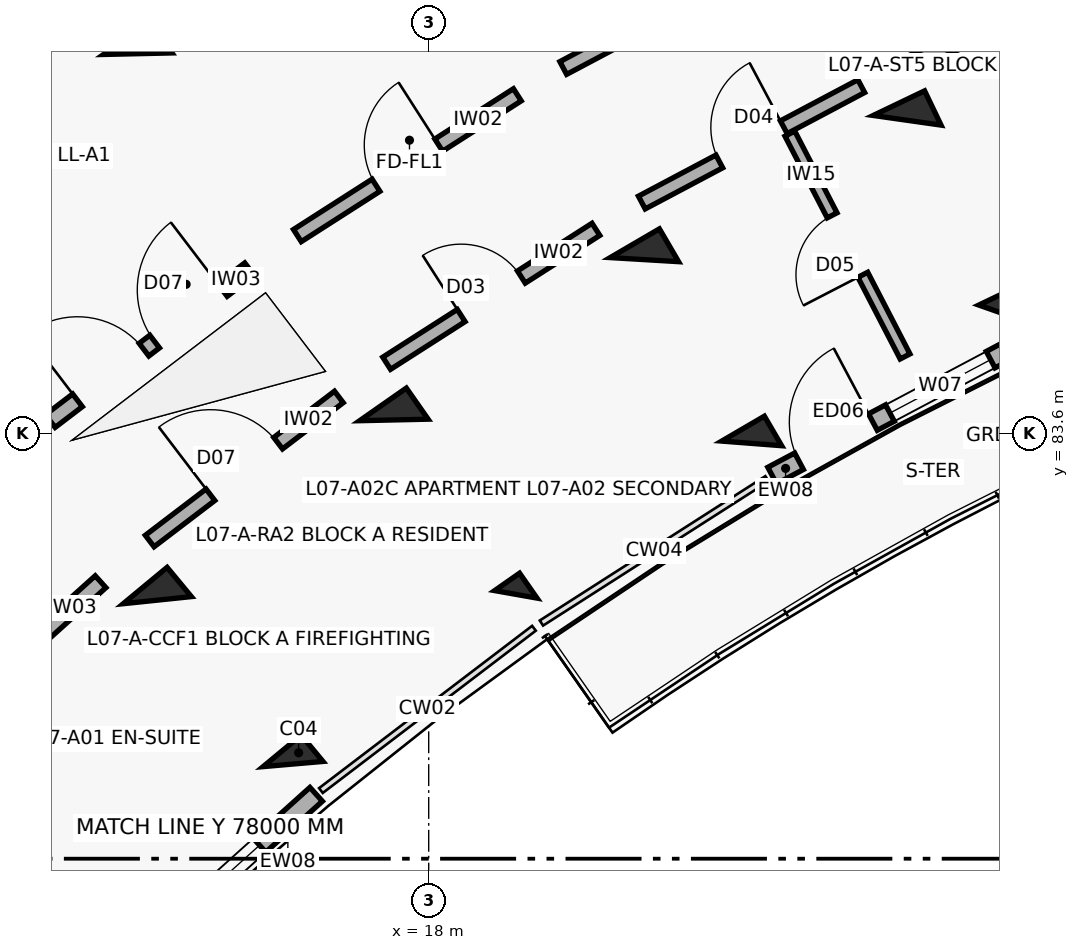
"""IFC4 building model, lengths in metres.
Left out: names, types, materials, properties, quantities, classifications, styles, units other than length and angle.
Written with IfcOpenShell. Run it as: python <this file> out.ifc"""

import sys

from ifc_helpers import new_model, si_unit, direction, frame, frame_2d, origin, origin_2d, place, context, subcontext, project, spatial, rectangle, extrude, element, fill, save


model = new_model("IFC4")
c1 = context("Model", 3, precision=1e-05, world=origin(), true_north=direction((0.0, 1.0)))
c2 = subcontext(c1, "Body", "Model", "MODEL_VIEW")
j1 = project(units=[si_unit("LENGTHUNIT", "METRE"), si_unit("PLANEANGLEUNIT", "RADIAN")], contexts=[c1])
p1 = place(None, origin())
s1 = spatial("IfcSite", under=j1, at=p1, CompositionType="ELEMENT")
p2 = place(p1, origin())
s2 = spatial("IfcBuilding", under=s1, at=p2, CompositionType="ELEMENT")
p3 = place(p2, frame((0.0, 0.0, 23.6)))
s3 = spatial("IfcBuildingStorey", under=s2, at=p3, CompositionType="ELEMENT", Elevation=23.6)
p4 = place(p3, frame((16.215, 79.245, 0.0), z_axis=(0.0, 0.0, 1.0), x_axis=(-0.637961754089, 0.770068049148, 0.0)))
e1 = element("IfcColumn", 1, at=p4, inside=s3, PredefinedType="COLUMN", context=c2, shape_type="SweptSolid", body=[
    extrude(rectangle(XDim=0.45, YDim=0.65, at=origin_2d()), origin(), (0.0, 0.0, 1.0), 3.1),
])
p5 = place(p3, frame((14.429, 81.402, 0.0), z_axis=(0.0, 0.0, 1.0), x_axis=(-0.637961754089, 0.770068049148, 0.0)))
e2 = element("IfcColumn", 2, at=p5, inside=s3, PredefinedType="COLUMN", context=c2, shape_type="SweptSolid", body=[
    extrude(rectangle(XDim=0.5, YDim=0.75, at=origin_2d()), origin(), (0.0, 0.0, 1.0), 3.1),
])
p6 = place(p3, frame((19.146, 81.478, 0.0), z_axis=(0.0, 0.0, 1.0), x_axis=(-0.573004420611, 0.819552276527, 0.0)))
e3 = element("IfcColumn", 3, at=p6, inside=s3, PredefinedType="COLUMN", context=c2, shape_type="SweptSolid", body=[
    extrude(rectangle(XDim=0.4, YDim=0.4, at=origin_2d()), origin(), (0.0, 0.0, 1.0), 3.1),
])
for number, where, z_axis, x_axis in (
    (4, (17.542, 83.773, 0.0), (0.0, 0.0, 1.0), (-0.573, 0.82, 0.0)),
    (5, (14.172, 88.592, 0.0), (0.0, 0.0, 1.0), (-0.573, 0.82, 0.0)),
):
    element("IfcColumn", number, at=place(p3, frame(where, z_axis=z_axis, x_axis=x_axis)), inside=s3, PredefinedType="COLUMN", context=c2, shape_type="SweptSolid", body=[
        extrude(rectangle(XDim=0.5, YDim=0.75, at=origin_2d()), origin(), (0.0, 0.0, 1.0), 3.1),
    ])
p7 = place(p3, frame((22.249, 83.464, 0.0), z_axis=(0.0, 0.0, 1.0), x_axis=(-0.504226211181, 0.863571611366, 0.0)))
e6 = element("IfcColumn", 6, at=p7, inside=s3, PredefinedType="COLUMN", context=c2, shape_type="SweptSolid", body=[
    extrude(rectangle(XDim=0.45, YDim=0.65, at=origin_2d()), origin(), (0.0, 0.0, 1.0), 3.1),
])
p8 = place(p3, frame((20.837, 85.882, 0.0), z_axis=(0.0, 0.0, 1.0), x_axis=(-0.504226211181, 0.863571611366, 0.0)))
e7 = element("IfcColumn", 7, at=p8, inside=s3, PredefinedType="COLUMN", context=c2, shape_type="SweptSolid", body=[
    extrude(rectangle(XDim=0.5, YDim=0.75, at=origin_2d()), origin(), (0.0, 0.0, 1.0), 3.1),
])
p9 = place(p3, frame((25.504, 85.191, 0.0), z_axis=(0.0, 0.0, 1.0), x_axis=(-0.432085748802, 0.901832526405, 0.0)))
e8 = element("IfcColumn", 8, at=p9, inside=s3, PredefinedType="COLUMN", context=c2, shape_type="SweptSolid", body=[
    extrude(rectangle(XDim=0.4, YDim=0.4, at=origin_2d()), origin(), (0.0, 0.0, 1.0), 3.1),
])
p10 = place(p3, frame((24.294, 87.716, 0.0), z_axis=(0.0, 0.0, 1.0), x_axis=(-0.432085748802, 0.901832526405, 0.0)))
e9 = element("IfcColumn", 9, at=p10, inside=s3, PredefinedType="COLUMN", context=c2, shape_type="SweptSolid", body=[
    extrude(rectangle(XDim=0.5, YDim=0.75, at=origin_2d()), origin(), (0.0, 0.0, 1.0), 3.1),
])
p11 = place(p3, frame((13.84, 76.437, 0.0), z_axis=(0.0, 0.0, 1.0), x_axis=(0.743385092197, 0.668863666751, 0.0)))
e10 = element("IfcWall", 10, at=p11, inside=s3, PredefinedType="SOLIDWALL", context=c2, shape_type="SweptSolid", body=[
    extrude(rectangle(XDim=3.604, YDim=0.245, at=frame_2d((1.802, 0.0))), origin(), (0.0, 0.0, 1.0), 2.25),
])
p12 = place(p11, frame((1.002, 0.0, 0.32)))
e11 = element("IfcOpeningElement", 11, at=p12, cuts=e10, PredefinedType="OPENING", context=c2, shape_type="SweptSolid", body=[
    extrude(rectangle(XDim=1.6, YDim=1.5, at=frame_2d((0.8, 0.75))), frame((0.0, 0.133, 0.0), z_axis=(0.0, -1.0, 0.0), x_axis=(1.0, 0.0, 0.0)), (0.0, 0.0, 1.0), 0.265),
])
p13 = place(p3, frame((22.519, 83.042, 0.0), z_axis=(0.0, 0.0, 1.0), x_axis=(0.883438308286, 0.468547495407, 0.0)))
e12 = element("IfcWall", 12, at=p13, inside=s3, PredefinedType="SOLIDWALL", context=c2, shape_type="SweptSolid", body=[
    extrude(rectangle(XDim=3.604, YDim=0.245, at=frame_2d((1.802, 0.0))), origin(), (0.0, 0.0, 1.0), 2.25),
])
p14 = place(p13, frame((0.4, 0.0, 0.0)))
e13 = element("IfcOpeningElement", 13, at=p14, cuts=e12, PredefinedType="OPENING", context=c2, shape_type="SweptSolid", body=[
    extrude(rectangle(XDim=1.1, YDim=2.15, at=frame_2d((0.55, 1.075))), frame((0.0, 0.133, 0.0), z_axis=(0.0, -1.0, 0.0), x_axis=(1.0, 0.0, 0.0)), (0.0, 0.0, 1.0), 0.265),
])
p15 = place(p13, frame((1.754, 0.0, 0.35)))
e14 = element("IfcOpeningElement", 14, at=p15, cuts=e12, PredefinedType="OPENING", context=c2, shape_type="SweptSolid", body=[
    extrude(rectangle(XDim=1.5, YDim=1.65, at=frame_2d((0.75, 0.825))), frame((0.0, 0.133, 0.0), z_axis=(0.0, -1.0, 0.0), x_axis=(1.0, 0.0, 0.0)), (0.0, 0.0, 1.0), 0.265),
])
p16 = place(p3, frame((11.357, 79.552, 0.0), z_axis=(0.0, 0.0, 1.0), x_axis=(0.743387266925, 0.668861249718, 0.0)))
e15 = element("IfcWall", 15, at=p16, inside=s3, PredefinedType="SOLIDWALL", context=c2, shape_type="SweptSolid", body=[
    extrude(rectangle(XDim=3.128, YDim=0.21, at=frame_2d((1.564, 0.0))), origin(), (0.0, 0.0, 1.0), 2.08),
])
p17 = place(p16, frame((1.014, 0.0, 0.0)))
e16 = element("IfcOpeningElement", 16, at=p17, cuts=e15, PredefinedType="OPENING", context=c2, shape_type="SweptSolid", body=[
    extrude(rectangle(XDim=1.1, YDim=2.15, at=frame_2d((0.55, 1.075))), frame((0.0, 0.115, 0.0), z_axis=(0.0, -1.0, 0.0), x_axis=(1.0, 0.0, 0.0)), (0.0, 0.0, 1.0), 0.23),
])
p18 = place(p3, frame((13.021, 83.759, 0.0), z_axis=(0.0, 0.0, 1.0), x_axis=(0.795498026433, 0.605956178235, 0.0)))
e17 = element("IfcWall", 17, at=p18, inside=s3, PredefinedType="SOLIDWALL", context=c2, shape_type="SweptSolid", body=[
    extrude(rectangle(XDim=3.296, YDim=0.21, at=frame_2d((1.648, 0.0))), origin(), (0.0, 0.0, 1.0), 2.08),
])
p19 = place(p18, frame((0.45, 0.0, 0.0)))
e18 = element("IfcOpeningElement", 18, at=p19, cuts=e17, PredefinedType="OPENING", context=c2, shape_type="SweptSolid", body=[
    extrude(rectangle(XDim=1.1, YDim=2.15, at=frame_2d((0.55, 1.075))), frame((0.0, 0.115, 0.0), z_axis=(0.0, -1.0, 0.0), x_axis=(1.0, 0.0, 0.0)), (0.0, 0.0, 1.0), 0.23),
])
p20 = place(p18, frame((1.726, 0.0, 0.0)))
e19 = element("IfcOpeningElement", 19, at=p20, cuts=e17, PredefinedType="OPENING", context=c2, shape_type="SweptSolid", body=[
    extrude(rectangle(XDim=1.12, YDim=2.15, at=frame_2d((0.56, 1.075))), frame((0.0, 0.115, 0.0), z_axis=(0.0, -1.0, 0.0), x_axis=(1.0, 0.0, 0.0)), (0.0, 0.0, 1.0), 0.23),
])
p21 = place(p3, frame((14.329, 82.18, 0.0), z_axis=(0.0, 0.0, 1.0), x_axis=(0.795501577908, 0.605951515838, 0.0)))
e20 = element("IfcWall", 20, at=p21, inside=s3, PredefinedType="SOLIDWALL", context=c2, shape_type="SweptSolid", body=[
    extrude(rectangle(XDim=3.129, YDim=0.19, at=frame_2d((1.564, 0.0))), origin(), (0.0, 0.0, 1.0), 2.08),
])
p22 = place(p21, frame((1.004, 0.0, 0.0)))
e21 = element("IfcOpeningElement", 21, at=p22, cuts=e20, PredefinedType="OPENING", context=c2, shape_type="SweptSolid", body=[
    extrude(rectangle(XDim=1.12, YDim=2.15, at=frame_2d((0.56, 1.075))), frame((0.0, 0.105, 0.0), z_axis=(0.0, -1.0, 0.0), x_axis=(1.0, 0.0, 0.0)), (0.0, 0.0, 1.0), 0.21),
])
p23 = place(p3, frame((16.272, 86.199, 0.0), z_axis=(0.0, 0.0, 1.0), x_axis=(0.842257205985, 0.539075874963, 0.0)))
e22 = element("IfcWall", 22, at=p23, inside=s3, PredefinedType="SOLIDWALL", context=c2, shape_type="SweptSolid", body=[
    extrude(rectangle(XDim=3.436, YDim=0.19, at=frame_2d((1.718, 0.0))), origin(), (0.0, 0.0, 1.0), 2.08),
])
p24 = place(p23, frame((1.228, 0.0, 0.0)))
e23 = element("IfcOpeningElement", 23, at=p24, cuts=e22, PredefinedType="OPENING", context=c2, shape_type="SweptSolid", body=[
    extrude(rectangle(XDim=0.98, YDim=2.15, at=frame_2d((0.49, 1.075))), frame((0.0, 0.105, 0.0), z_axis=(0.0, -1.0, 0.0), x_axis=(1.0, 0.0, 0.0)), (0.0, 0.0, 1.0), 0.21),
])
p25 = place(p3, frame((17.447, 84.519, 0.0), z_axis=(0.0, 0.0, 1.0), x_axis=(0.842225276846, 0.539125758095, 0.0)))
e24 = element("IfcWall", 24, at=p25, inside=s3, PredefinedType="SOLIDWALL", context=c2, shape_type="SweptSolid", body=[
    extrude(rectangle(XDim=3.269, YDim=0.19, at=frame_2d((1.634, 0.0))), origin(), (0.0, 0.0, 1.0), 2.08),
])
p26 = place(p25, frame((1.164, 0.0, 0.0)))
e25 = element("IfcOpeningElement", 25, at=p26, cuts=e24, PredefinedType="OPENING", context=c2, shape_type="SweptSolid", body=[
    extrude(rectangle(XDim=0.94, YDim=2.1, at=frame_2d((0.47, 1.05))), frame((0.0, 0.105, 0.0), z_axis=(0.0, -1.0, 0.0), x_axis=(1.0, 0.0, 0.0)), (0.0, 0.0, 1.0), 0.21),
])
p27 = place(p3, frame((19.77, 88.404, 0.0), z_axis=(0.0, 0.0, 1.0), x_axis=(0.883410853063, 0.468599258099, 0.0)))
e26 = element("IfcWall", 26, at=p27, inside=s3, PredefinedType="SOLIDWALL", context=c2, shape_type="SweptSolid", body=[
    extrude(rectangle(XDim=3.436, YDim=0.19, at=frame_2d((1.718, 0.0))), origin(), (0.0, 0.0, 1.0), 2.08),
])
p28 = place(p27, frame((1.208, 0.0, 0.0)))
e27 = element("IfcOpeningElement", 27, at=p28, cuts=e26, PredefinedType="OPENING", context=c2, shape_type="SweptSolid", body=[
    extrude(rectangle(XDim=1.02, YDim=2.15, at=frame_2d((0.51, 1.075))), frame((0.0, 0.105, 0.0), z_axis=(0.0, -1.0, 0.0), x_axis=(1.0, 0.0, 0.0)), (0.0, 0.0, 1.0), 0.21),
])
p29 = place(p3, frame((20.804, 86.634, 0.0), z_axis=(0.0, 0.0, 1.0), x_axis=(0.883444301944, 0.468536194293, 0.0)))
e28 = element("IfcWall", 28, at=p29, inside=s3, PredefinedType="SOLIDWALL", context=c2, shape_type="SweptSolid", body=[
    extrude(rectangle(XDim=3.269, YDim=0.19, at=frame_2d((1.634, 0.0))), origin(), (0.0, 0.0, 1.0), 2.08),
])
p30 = place(p29, frame((1.154, 0.0, 0.0)))
e29 = element("IfcOpeningElement", 29, at=p30, cuts=e28, PredefinedType="OPENING", context=c2, shape_type="SweptSolid", body=[
    extrude(rectangle(XDim=0.96, YDim=2.1, at=frame_2d((0.48, 1.05))), frame((0.0, 0.105, 0.0), z_axis=(0.0, -1.0, 0.0), x_axis=(1.0, 0.0, 0.0)), (0.0, 0.0, 1.0), 0.21),
])
p31 = place(p3, frame((24.267, 84.608, 0.0), z_axis=(0.0, 0.0, 1.0), x_axis=(-0.459217611894, 0.888323806349, 0.0)))
e30 = element("IfcWall", 30, at=p31, inside=s3, PredefinedType="PARTITIONING", context=c2, shape_type="SweptSolid", body=[
    extrude(rectangle(XDim=3.3, YDim=0.145, at=frame_2d((1.65, 0.0))), origin(), (0.0, 0.0, 1.0), 2.08),
])
p32 = place(p31, frame((1.21, 0.0, 0.0)))
e31 = element("IfcOpeningElement", 31, at=p32, cuts=e30, PredefinedType="OPENING", context=c2, shape_type="SweptSolid", body=[
    extrude(rectangle(XDim=0.88, YDim=2.1, at=frame_2d((0.44, 1.05))), frame((0.0, 0.083, 0.0), z_axis=(0.0, -1.0, 0.0), x_axis=(1.0, 0.0, 0.0)), (0.0, 0.0, 1.0), 0.165),
])
p33 = place(p3, frame((24.322, 88.467, 0.0), z_axis=(0.0, 0.0, 1.0), x_axis=(0.918723391052, 0.394901672235, 0.0)))
e32 = element("IfcWall", 32, at=p33, inside=s3, PredefinedType="SOLIDWALL", context=c2, shape_type="SweptSolid", body=[
    extrude(rectangle(XDim=3.269, YDim=0.19, at=frame_2d((1.634, 0.0))), origin(), (0.0, 0.0, 1.0), 2.08),
])
p34 = place(p33, frame((1.184, 0.0, 0.0)))
e33 = element("IfcOpeningElement", 33, at=p34, cuts=e32, PredefinedType="OPENING", context=c2, shape_type="SweptSolid", body=[
    extrude(rectangle(XDim=0.9, YDim=2.1, at=frame_2d((0.45, 1.05))), frame((0.0, 0.105, 0.0), z_axis=(0.0, -1.0, 0.0), x_axis=(1.0, 0.0, 0.0)), (0.0, 0.0, 1.0), 0.21),
])
p35 = place(p12, origin())
e34 = element("IfcWindow", 34, at=p35, inside=s3, PartitioningType="DOUBLE_PANEL_VERTICAL", PredefinedType="WINDOW", context=c2, shape_type="SweptSolid", body=[
    extrude(rectangle(XDim=1.6, YDim=1.5, at=frame_2d((0.8, 0.75))), frame((0.0, 0.03, 0.0), z_axis=(0.0, -1.0, 0.0), x_axis=(1.0, 0.0, 0.0)), (0.0, 0.0, 1.0), 0.06),
])
fill(e11, e34)
p36 = place(p14, origin())
e35 = element("IfcDoor", 35, at=p36, inside=s3, OperationType="SINGLE_SWING_RIGHT", PredefinedType="DOOR", context=c2, shape_type="SweptSolid", body=[
    extrude(rectangle(XDim=1.1, YDim=2.15, at=frame_2d((0.55, 1.075))), frame((0.0, 0.025, 0.0), z_axis=(0.0, -1.0, 0.0), x_axis=(1.0, 0.0, 0.0)), (0.0, 0.0, 1.0), 0.05),
])
fill(e13, e35)
p37 = place(p15, origin())
e36 = element("IfcWindow", 36, at=p37, inside=s3, PartitioningType="DOUBLE_PANEL_VERTICAL", PredefinedType="WINDOW", context=c2, shape_type="SweptSolid", body=[
    extrude(rectangle(XDim=1.5, YDim=1.65, at=frame_2d((0.75, 0.825))), frame((0.0, 0.03, 0.0), z_axis=(0.0, -1.0, 0.0), x_axis=(1.0, 0.0, 0.0)), (0.0, 0.0, 1.0), 0.06),
])
fill(e14, e36)
p38 = place(p19, origin())
e37 = element("IfcDoor", 37, at=p38, inside=s3, OperationType="SINGLE_SWING_LEFT", PredefinedType="DOOR", context=c2, shape_type="SweptSolid", body=[
    extrude(rectangle(XDim=1.1, YDim=2.15, at=frame_2d((0.55, 1.075))), frame((0.0, 0.025, 0.0), z_axis=(0.0, -1.0, 0.0), x_axis=(1.0, 0.0, 0.0)), (0.0, 0.0, 1.0), 0.05),
])
fill(e18, e37)
p39 = place(p20, origin())
e38 = element("IfcDoor", 38, at=p39, inside=s3, OperationType="SINGLE_SWING_RIGHT", PredefinedType="DOOR", context=c2, shape_type="SweptSolid", body=[
    extrude(rectangle(XDim=1.12, YDim=2.15, at=frame_2d((0.56, 1.075))), frame((0.0, 0.025, 0.0), z_axis=(0.0, -1.0, 0.0), x_axis=(1.0, 0.0, 0.0)), (0.0, 0.0, 1.0), 0.05),
])
fill(e19, e38)
p40 = place(p22, origin())
e39 = element("IfcDoor", 39, at=p40, inside=s3, OperationType="SINGLE_SWING_LEFT", PredefinedType="DOOR", context=c2, shape_type="SweptSolid", body=[
    extrude(rectangle(XDim=1.12, YDim=2.15, at=frame_2d((0.56, 1.075))), frame((0.0, 0.025, 0.0), z_axis=(0.0, -1.0, 0.0), x_axis=(1.0, 0.0, 0.0)), (0.0, 0.0, 1.0), 0.05),
])
fill(e21, e39)
p41 = place(p24, origin())
e40 = element("IfcDoor", 40, at=p41, inside=s3, OperationType="SINGLE_SWING_RIGHT", PredefinedType="DOOR", context=c2, shape_type="SweptSolid", body=[
    extrude(rectangle(XDim=0.98, YDim=2.15, at=frame_2d((0.49, 1.075))), frame((0.0, 0.025, 0.0), z_axis=(0.0, -1.0, 0.0), x_axis=(1.0, 0.0, 0.0)), (0.0, 0.0, 1.0), 0.05),
])
fill(e23, e40)
p42 = place(p26, origin())
e41 = element("IfcDoor", 41, at=p42, inside=s3, OperationType="SINGLE_SWING_LEFT", PredefinedType="DOOR", context=c2, shape_type="SweptSolid", body=[
    extrude(rectangle(XDim=0.94, YDim=2.1, at=frame_2d((0.47, 1.05))), frame((0.0, 0.025, 0.0), z_axis=(0.0, -1.0, 0.0), x_axis=(1.0, 0.0, 0.0)), (0.0, 0.0, 1.0), 0.05),
])
fill(e25, e41)
p43 = place(p30, origin())
e42 = element("IfcDoor", 42, at=p43, inside=s3, OperationType="SINGLE_SWING_RIGHT", PredefinedType="DOOR", context=c2, shape_type="SweptSolid", body=[
    extrude(rectangle(XDim=0.96, YDim=2.1, at=frame_2d((0.48, 1.05))), frame((0.0, 0.025, 0.0), z_axis=(0.0, -1.0, 0.0), x_axis=(1.0, 0.0, 0.0)), (0.0, 0.0, 1.0), 0.05),
])
fill(e29, e42)
p44 = place(p32, origin())
e43 = element("IfcDoor", 43, at=p44, inside=s3, OperationType="SINGLE_SWING_LEFT", PredefinedType="DOOR", context=c2, shape_type="SweptSolid", body=[
    extrude(rectangle(XDim=0.88, YDim=2.1, at=frame_2d((0.44, 1.05))), frame((0.0, 0.025, 0.0), z_axis=(0.0, -1.0, 0.0), x_axis=(1.0, 0.0, 0.0)), (0.0, 0.0, 1.0), 0.05),
])
fill(e31, e43)
save(model, sys.argv[1])
